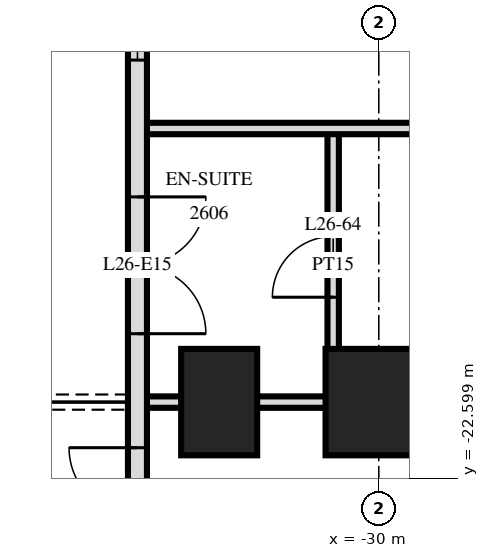
"""IFC4 building model, lengths in metres.
Left out: names, types, materials, properties, quantities, classifications, styles, units other than length and angle.
Written with IfcOpenShell. Run it as: python <this file> out.ifc"""

import sys

from ifc_helpers import new_model, si_unit, direction, frame, frame_2d, origin, origin_2d, place, context, subcontext, project, spatial, rectangle, extrude, element, fill, save


model = new_model("IFC4")
c1 = context("Model", 3, precision=1e-05, world=origin(), true_north=direction((0.0, 1.0)))
c2 = subcontext(c1, "Body", "Model", "MODEL_VIEW")
j1 = project(units=[si_unit("LENGTHUNIT", "METRE"), si_unit("PLANEANGLEUNIT", "RADIAN")], contexts=[c1])
p1 = place(None, origin())
s1 = spatial("IfcSite", under=j1, at=p1, CompositionType="ELEMENT")
p2 = place(p1, origin())
s2 = spatial("IfcBuilding", under=s1, at=p2, CompositionType="ELEMENT")
p3 = place(p2, frame((0.0, 0.0, 103.2)))
s3 = spatial("IfcBuildingStorey", under=s2, at=p3, CompositionType="ELEMENT", Elevation=103.2)
p4 = place(p3, frame((-32.1, -21.6, 0.0), z_axis=(0.0, 0.0, 1.0), x_axis=(0.0, 1.0, 0.0)))
e1 = element("IfcColumn", 1, at=p4, inside=s3, PredefinedType="COLUMN", context=c2, shape_type="SweptSolid", body=[
    extrude(rectangle(XDim=1.4, YDim=1.0, at=origin_2d()), origin(), (0.0, 0.0, 1.0), 3.6),
])
p5 = place(p3, frame((-30.0, -21.6, 0.0), z_axis=(0.0, 0.0, 1.0), x_axis=(1.0, 0.0, 0.0)))
e2 = element("IfcColumn", 2, at=p5, inside=s3, PredefinedType="COLUMN", context=c2, shape_type="SweptSolid", body=[
    extrude(rectangle(XDim=1.4, YDim=1.4, at=origin_2d()), origin(), (0.0, 0.0, 1.0), 3.6),
])
p6 = place(p3, frame((-33.175, -3.325, 0.0), z_axis=(0.0, 0.0, 1.0), x_axis=(0.0, -1.0, 0.0)))
e3 = element("IfcWall", 3, at=p6, inside=s3, PredefinedType="SOLIDWALL", context=c2, shape_type="SweptSolid", body=[
    extrude(rectangle(XDim=21.551, YDim=0.25, at=frame_2d((10.775, 0.0))), origin(), (0.0, 0.0, 1.0), 3.3),
])
p7 = place(p6, frame((6.575, 0.0, 0.0)))
e4 = element("IfcOpeningElement", 4, at=p7, cuts=e3, PredefinedType="OPENING", context=c2, shape_type="SweptSolid", body=[
    extrude(rectangle(XDim=1.8, YDim=2.4, at=frame_2d((0.9, 1.2))), frame((0.0, 0.135, 0.0), z_axis=(0.0, -1.0, 0.0), x_axis=(1.0, 0.0, 0.0)), (0.0, 0.0, 1.0), 0.27),
])
p8 = place(p6, frame((9.425, 0.0, 0.3)))
e5 = element("IfcOpeningElement", 5, at=p8, cuts=e3, PredefinedType="OPENING", context=c2, shape_type="SweptSolid", body=[
    extrude(rectangle(XDim=1.8, YDim=2.1, at=frame_2d((0.9, 1.05))), frame((0.0, 0.135, 0.0), z_axis=(0.0, -1.0, 0.0), x_axis=(1.0, 0.0, 0.0)), (0.0, 0.0, 1.0), 0.27),
])
p9 = place(p6, frame((12.575, 0.0, 0.3)))
e6 = element("IfcOpeningElement", 6, at=p9, cuts=e3, PredefinedType="OPENING", context=c2, shape_type="SweptSolid", body=[
    extrude(rectangle(XDim=1.2, YDim=2.1, at=frame_2d((0.6, 1.05))), frame((0.0, 0.135, 0.0), z_axis=(0.0, -1.0, 0.0), x_axis=(1.0, 0.0, 0.0)), (0.0, 0.0, 1.0), 0.27),
])
p10 = place(p6, frame((15.575, 0.0, 0.0)))
e7 = element("IfcOpeningElement", 7, at=p10, cuts=e3, PredefinedType="OPENING", context=c2, shape_type="SweptSolid", body=[
    extrude(rectangle(XDim=1.8, YDim=2.4, at=frame_2d((0.9, 1.2))), frame((0.0, 0.135, 0.0), z_axis=(0.0, -1.0, 0.0), x_axis=(1.0, 0.0, 0.0)), (0.0, 0.0, 1.0), 0.27),
])
p11 = place(p6, frame((18.875, 0.0, 0.0)))
e8 = element("IfcOpeningElement", 8, at=p11, cuts=e3, PredefinedType="OPENING", context=c2, shape_type="SweptSolid", body=[
    extrude(rectangle(XDim=1.8, YDim=2.4, at=frame_2d((0.9, 1.2))), frame((0.0, 0.135, 0.0), z_axis=(0.0, -1.0, 0.0), x_axis=(1.0, 0.0, 0.0)), (0.0, 0.0, 1.0), 0.27),
])
p12 = place(p3, frame((-30.6, -21.6, 0.0), z_axis=(0.0, 0.0, 1.0), x_axis=(0.0, 1.0, 0.0)))
e9 = element("IfcWall", 9, at=p12, inside=s3, PredefinedType="PARTITIONING", context=c2, shape_type="SweptSolid", body=[
    extrude(rectangle(XDim=3.6, YDim=0.15, at=frame_2d((1.8, 0.0))), origin(), (0.0, 0.0, 1.0), 3.32),
])
p13 = place(p12, frame((1.38, 0.0, 0.0)))
e10 = element("IfcOpeningElement", 10, at=p13, cuts=e9, PredefinedType="OPENING", context=c2, shape_type="SweptSolid", body=[
    extrude(rectangle(XDim=0.8, YDim=2.1, at=frame_2d((0.4, 1.05))), frame((0.0, 0.085, 0.0), z_axis=(0.0, -1.0, 0.0), x_axis=(1.0, 0.0, 0.0)), (0.0, 0.0, 1.0), 0.17),
])
p14 = place(p3, frame((-33.12, -21.6, 0.0), z_axis=(0.0, 0.0, 1.0), x_axis=(1.0, 0.0, 0.0)))
e11 = element("IfcWall", 11, at=p14, inside=s3, PredefinedType="PARTITIONING", context=c2, shape_type="SweptSolid", body=[
    extrude(rectangle(XDim=2.52, YDim=0.15, at=frame_2d((1.26, 0.0))), origin(), (0.0, 0.0, 1.0), 3.32),
])
p15 = place(p3, frame((-33.12, -18.0, 0.0), z_axis=(0.0, 0.0, 1.0), x_axis=(1.0, 0.0, 0.0)))
e12 = element("IfcWall", 12, at=p15, inside=s3, PredefinedType="PARTITIONING", context=c2, shape_type="SweptSolid", body=[
    extrude(rectangle(XDim=66.24, YDim=0.15, at=frame_2d((33.12, 0.0))), origin(), (0.0, 0.0, 1.0), 3.32),
])
p16 = place(p15, frame((14.02, 0.0, 0.0)))
e13 = element("IfcOpeningElement", 13, at=p16, cuts=e12, PredefinedType="OPENING", context=c2, shape_type="SweptSolid", body=[
    extrude(rectangle(XDim=1.0, YDim=2.1, at=frame_2d((0.5, 1.05))), frame((0.0, 0.085, 0.0), z_axis=(0.0, -1.0, 0.0), x_axis=(1.0, 0.0, 0.0)), (0.0, 0.0, 1.0), 0.17),
])
p17 = place(p15, frame((18.82, 0.0, 0.0)))
e14 = element("IfcOpeningElement", 14, at=p17, cuts=e12, PredefinedType="OPENING", context=c2, shape_type="SweptSolid", body=[
    extrude(rectangle(XDim=1.0, YDim=2.1, at=frame_2d((0.5, 1.05))), frame((0.0, 0.085, 0.0), z_axis=(0.0, -1.0, 0.0), x_axis=(1.0, 0.0, 0.0)), (0.0, 0.0, 1.0), 0.17),
])
p18 = place(p15, frame((30.27, 0.0, 0.0)))
e15 = element("IfcOpeningElement", 15, at=p18, cuts=e12, PredefinedType="OPENING", context=c2, shape_type="SweptSolid", body=[
    extrude(rectangle(XDim=1.0, YDim=2.1, at=frame_2d((0.5, 1.05))), frame((0.0, 0.085, 0.0), z_axis=(0.0, -1.0, 0.0), x_axis=(1.0, 0.0, 0.0)), (0.0, 0.0, 1.0), 0.17),
])
p19 = place(p15, frame((33.82, 0.0, 0.0)))
e16 = element("IfcOpeningElement", 16, at=p19, cuts=e12, PredefinedType="OPENING", context=c2, shape_type="SweptSolid", body=[
    extrude(rectangle(XDim=1.0, YDim=2.1, at=frame_2d((0.5, 1.05))), frame((0.0, 0.085, 0.0), z_axis=(0.0, -1.0, 0.0), x_axis=(1.0, 0.0, 0.0)), (0.0, 0.0, 1.0), 0.17),
])
p20 = place(p15, frame((46.27, 0.0, 0.0)))
e17 = element("IfcOpeningElement", 17, at=p20, cuts=e12, PredefinedType="OPENING", context=c2, shape_type="SweptSolid", body=[
    extrude(rectangle(XDim=1.0, YDim=2.1, at=frame_2d((0.5, 1.05))), frame((0.0, 0.085, 0.0), z_axis=(0.0, -1.0, 0.0), x_axis=(1.0, 0.0, 0.0)), (0.0, 0.0, 1.0), 0.17),
])
p21 = place(p15, frame((6.07, 0.0, 0.0)))
e18 = element("IfcOpeningElement", 18, at=p21, cuts=e12, PredefinedType="OPENING", context=c2, shape_type="SweptSolid", body=[
    extrude(rectangle(XDim=1.0, YDim=2.1, at=frame_2d((0.5, 1.05))), frame((0.0, 0.085, 0.0), z_axis=(0.0, -1.0, 0.0), x_axis=(1.0, 0.0, 0.0)), (0.0, 0.0, 1.0), 0.17),
])
p22 = place(p15, frame((60.37, 0.0, 0.0)))
e19 = element("IfcOpeningElement", 19, at=p22, cuts=e12, PredefinedType="OPENING", context=c2, shape_type="SweptSolid", body=[
    extrude(rectangle(XDim=1.0, YDim=2.1, at=frame_2d((0.5, 1.05))), frame((0.0, 0.085, 0.0), z_axis=(0.0, -1.0, 0.0), x_axis=(1.0, 0.0, 0.0)), (0.0, 0.0, 1.0), 0.17),
])
p23 = place(p9, origin())
e20 = element("IfcWindow", 20, at=p23, inside=s3, PartitioningType="SINGLE_PANEL", PredefinedType="WINDOW", context=c2, shape_type="SweptSolid", body=[
    extrude(rectangle(XDim=1.2, YDim=2.1, at=frame_2d((0.6, 1.05))), frame((0.0, 0.03, 0.0), z_axis=(0.0, -1.0, 0.0), x_axis=(1.0, 0.0, 0.0)), (0.0, 0.0, 1.0), 0.06),
])
fill(e6, e20)
p24 = place(p10, origin())
e21 = element("IfcDoor", 21, at=p24, inside=s3, OperationType="DOUBLE_DOOR_SINGLE_SWING", PredefinedType="DOOR", context=c2, shape_type="SweptSolid", body=[
    extrude(rectangle(XDim=1.8, YDim=2.4, at=frame_2d((0.9, 1.2))), frame((0.0, 0.025, 0.0), z_axis=(0.0, -1.0, 0.0), x_axis=(1.0, 0.0, 0.0)), (0.0, 0.0, 1.0), 0.05),
])
fill(e7, e21)
p25 = place(p11, frame((0.9, 0.0, 0.0), z_axis=(0.0, 0.0, 1.0), x_axis=(-1.0, 0.0, 0.0)))
e22 = element("IfcDoor", 22, at=p25, inside=s3, OperationType="DOUBLE_DOOR_SINGLE_SWING", PredefinedType="DOOR", context=c2, shape_type="SweptSolid", body=[
    extrude(rectangle(XDim=1.8, YDim=2.4, at=frame_2d((0.0, 1.2))), frame((0.0, -0.025, 0.0), z_axis=(0.0, 1.0, 0.0), x_axis=(-1.0, 0.0, 0.0)), (0.0, 0.0, 1.0), 0.05),
])
fill(e8, e22)
p26 = place(p13, origin())
e23 = element("IfcDoor", 23, at=p26, inside=s3, OperationType="SINGLE_SWING_RIGHT", PredefinedType="DOOR", context=c2, shape_type="SweptSolid", body=[
    extrude(rectangle(XDim=0.8, YDim=2.1, at=frame_2d((0.4, 1.05))), frame((0.0, 0.025, 0.0), z_axis=(0.0, -1.0, 0.0), x_axis=(1.0, 0.0, 0.0)), (0.0, 0.0, 1.0), 0.05),
])
fill(e10, e23)
save(model, sys.argv[1])
